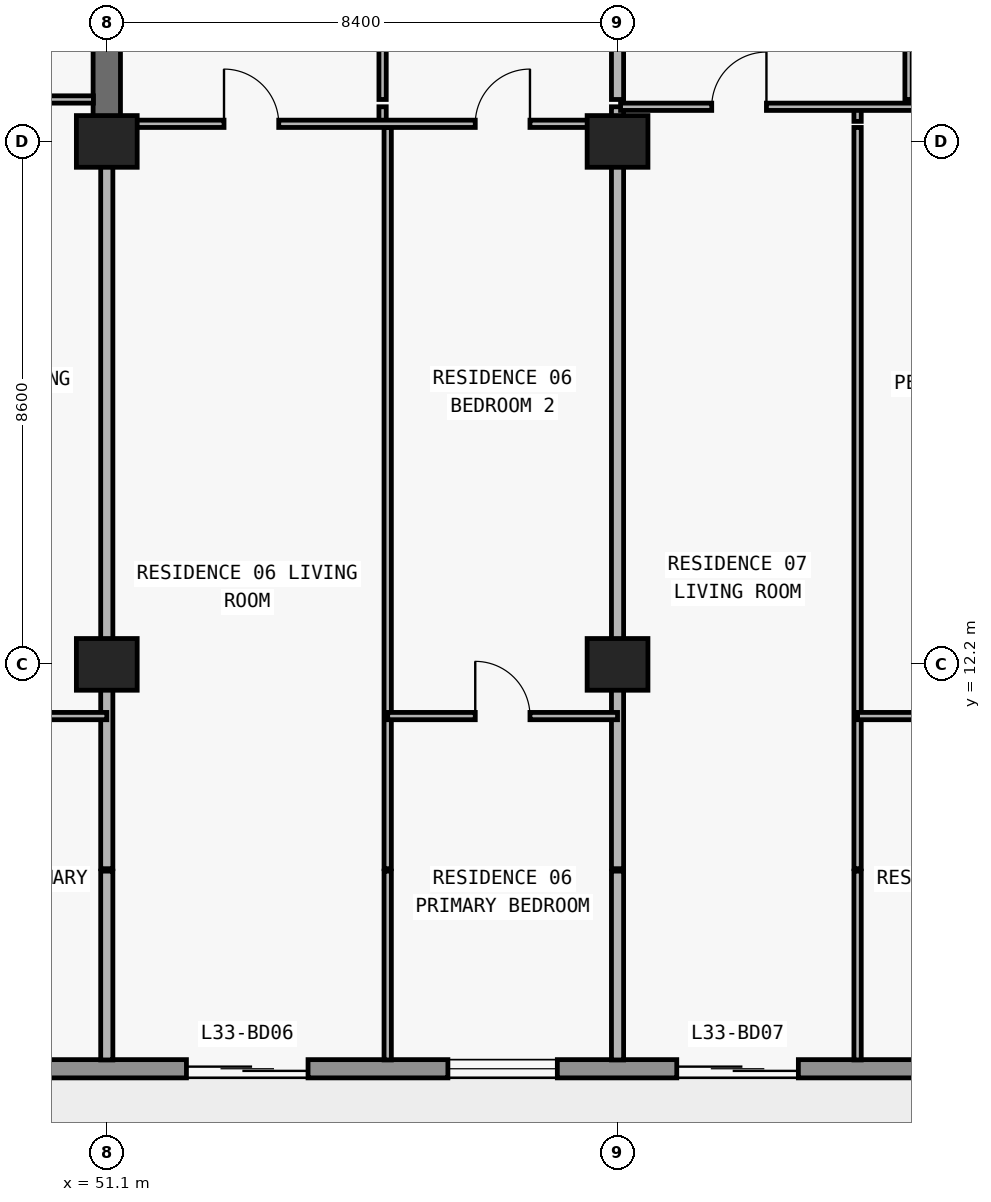
"""IFC4 building model, lengths in metres.
Left out: names, types, materials, properties, quantities, classifications, styles, units other than length and angle.
Written with IfcOpenShell. Run it as: python <this file> out.ifc"""

import sys

from ifc_helpers import new_model, si_unit, direction, frame, frame_2d, origin, origin_2d, place, context, subcontext, project, spatial, rectangle, extrude, element, fill, save


model = new_model("IFC4")
c1 = context("Model", 3, precision=1e-05, world=origin(), true_north=direction((0.0, 1.0)))
c2 = subcontext(c1, "Body", "Model", "MODEL_VIEW")
j1 = project(units=[si_unit("LENGTHUNIT", "METRE"), si_unit("PLANEANGLEUNIT", "RADIAN")], contexts=[c1])
p1 = place(None, origin())
s1 = spatial("IfcSite", under=j1, at=p1, CompositionType="ELEMENT")
p2 = place(p1, origin())
s2 = spatial("IfcBuilding", under=s1, at=p2, CompositionType="ELEMENT")
p3 = place(p2, frame((0.0, 0.0, 122.4)))
s3 = spatial("IfcBuildingStorey", under=s2, at=p3, CompositionType="ELEMENT", Elevation=122.4)
for number, where, z_axis, x_axis in (
    (1, (51.1, 12.2, 0.0), (0.0, 0.0, 1.0), (1.0, 0.0, 0.0)),
    (2, (59.5, 12.2, 0.0), (0.0, 0.0, 1.0), (1.0, 0.0, 0.0)),
    (3, (51.1, 20.8, 0.0), (0.0, 0.0, 1.0), (1.0, 0.0, 0.0)),
    (4, (59.5, 20.8, 0.0), (0.0, 0.0, 1.0), (1.0, 0.0, 0.0)),
):
    element("IfcColumn", number, at=place(p3, frame(where, z_axis=z_axis, x_axis=x_axis)), inside=s3, PredefinedType="COLUMN", context=c2, shape_type="SweptSolid", body=[
        extrude(rectangle(XDim=1.0, YDim=0.85, at=origin_2d()), origin(), (0.0, 0.0, 1.0), 3.05),
    ])
p4 = place(p3, frame((51.1, 20.8, 0.0), z_axis=(0.0, 0.0, 1.0), x_axis=(0.0, 1.0, 0.0)))
e5 = element("IfcWall", 5, at=p4, inside=s3, PredefinedType="SHEAR", context=c2, shape_type="SweptSolid", body=[
    extrude(rectangle(XDim=8.6, YDim=0.45, at=frame_2d((4.3, 0.0))), origin(), (0.0, 0.0, 1.0), 3.05),
])
p5 = place(p3, frame((70.1, 5.55, 0.0), z_axis=(0.0, 0.0, 1.0), x_axis=(-1.0, 0.0, 0.0)))
e6 = element("IfcWall", 6, at=p5, inside=s3, PredefinedType="STANDARD", context=c2, shape_type="SweptSolid", body=[
    extrude(rectangle(XDim=62.4, YDim=0.3, at=frame_2d((31.2, 0.0))), origin(), (0.0, 0.0, 1.0), 3.05),
])
p6 = place(p5, frame((57.226, 0.0, 0.0)))
e7 = element("IfcOpeningElement", 7, at=p6, cuts=e6, PredefinedType="OPENING", context=c2, shape_type="SweptSolid", body=[
    extrude(rectangle(XDim=2.0, YDim=2.3, at=frame_2d((1.0, 1.15))), frame((0.0, 0.16, 0.0), z_axis=(0.0, -1.0, 0.0), x_axis=(1.0, 0.0, 0.0)), (0.0, 0.0, 1.0), 0.32),
])
p7 = place(p5, frame((52.926, 0.0, 0.85)))
e8 = element("IfcOpeningElement", 8, at=p7, cuts=e6, PredefinedType="OPENING", context=c2, shape_type="SweptSolid", body=[
    extrude(rectangle(XDim=2.2, YDim=1.55, at=frame_2d((1.1, 0.775))), frame((0.0, 0.16, 0.0), z_axis=(0.0, -1.0, 0.0), x_axis=(1.0, 0.0, 0.0)), (0.0, 0.0, 1.0), 0.32),
])
p8 = place(p5, frame((48.49, 0.0, 0.0)))
e9 = element("IfcOpeningElement", 9, at=p8, cuts=e6, PredefinedType="OPENING", context=c2, shape_type="SweptSolid", body=[
    extrude(rectangle(XDim=2.0, YDim=2.3, at=frame_2d((1.0, 1.15))), frame((0.0, 0.16, 0.0), z_axis=(0.0, -1.0, 0.0), x_axis=(1.0, 0.0, 0.0)), (0.0, 0.0, 1.0), 0.32),
])
p9 = place(p5, frame((44.39, 0.0, 0.85)))
e10 = element("IfcOpeningElement", 10, at=p9, cuts=e6, PredefinedType="OPENING", context=c2, shape_type="SweptSolid", body=[
    extrude(rectangle(XDim=1.8, YDim=1.55, at=frame_2d((0.9, 0.775))), frame((0.0, 0.16, 0.0), z_axis=(0.0, -1.0, 0.0), x_axis=(1.0, 0.0, 0.0)), (0.0, 0.0, 1.0), 0.32),
])
p10 = place(p5, frame((40.426, 0.0, 0.0)))
e11 = element("IfcOpeningElement", 11, at=p10, cuts=e6, PredefinedType="OPENING", context=c2, shape_type="SweptSolid", body=[
    extrude(rectangle(XDim=2.0, YDim=2.3, at=frame_2d((1.0, 1.15))), frame((0.0, 0.16, 0.0), z_axis=(0.0, -1.0, 0.0), x_axis=(1.0, 0.0, 0.0)), (0.0, 0.0, 1.0), 0.32),
])
p11 = place(p5, frame((36.126, 0.0, 0.85)))
e12 = element("IfcOpeningElement", 12, at=p11, cuts=e6, PredefinedType="OPENING", context=c2, shape_type="SweptSolid", body=[
    extrude(rectangle(XDim=2.2, YDim=1.55, at=frame_2d((1.1, 0.775))), frame((0.0, 0.16, 0.0), z_axis=(0.0, -1.0, 0.0), x_axis=(1.0, 0.0, 0.0)), (0.0, 0.0, 1.0), 0.32),
])
p12 = place(p5, frame((31.91, 0.0, 0.0)))
e13 = element("IfcOpeningElement", 13, at=p12, cuts=e6, PredefinedType="OPENING", context=c2, shape_type="SweptSolid", body=[
    extrude(rectangle(XDim=2.0, YDim=2.3, at=frame_2d((1.0, 1.15))), frame((0.0, 0.16, 0.0), z_axis=(0.0, -1.0, 0.0), x_axis=(1.0, 0.0, 0.0)), (0.0, 0.0, 1.0), 0.32),
])
p13 = place(p5, frame((28.21, 0.0, 0.85)))
e14 = element("IfcOpeningElement", 14, at=p13, cuts=e6, PredefinedType="OPENING", context=c2, shape_type="SweptSolid", body=[
    extrude(rectangle(XDim=1.8, YDim=1.55, at=frame_2d((0.9, 0.775))), frame((0.0, 0.16, 0.0), z_axis=(0.0, -1.0, 0.0), x_axis=(1.0, 0.0, 0.0)), (0.0, 0.0, 1.0), 0.32),
])
p14 = place(p5, frame((24.426, 0.0, 0.0)))
e15 = element("IfcOpeningElement", 15, at=p14, cuts=e6, PredefinedType="OPENING", context=c2, shape_type="SweptSolid", body=[
    extrude(rectangle(XDim=2.0, YDim=2.3, at=frame_2d((1.0, 1.15))), frame((0.0, 0.16, 0.0), z_axis=(0.0, -1.0, 0.0), x_axis=(1.0, 0.0, 0.0)), (0.0, 0.0, 1.0), 0.32),
])
p15 = place(p5, frame((20.126, 0.0, 0.85)))
e16 = element("IfcOpeningElement", 16, at=p15, cuts=e6, PredefinedType="OPENING", context=c2, shape_type="SweptSolid", body=[
    extrude(rectangle(XDim=2.2, YDim=1.55, at=frame_2d((1.1, 0.775))), frame((0.0, 0.16, 0.0), z_axis=(0.0, -1.0, 0.0), x_axis=(1.0, 0.0, 0.0)), (0.0, 0.0, 1.0), 0.32),
])
p16 = place(p5, frame((15.69, 0.0, 0.0)))
e17 = element("IfcOpeningElement", 17, at=p16, cuts=e6, PredefinedType="OPENING", context=c2, shape_type="SweptSolid", body=[
    extrude(rectangle(XDim=2.0, YDim=2.3, at=frame_2d((1.0, 1.15))), frame((0.0, 0.16, 0.0), z_axis=(0.0, -1.0, 0.0), x_axis=(1.0, 0.0, 0.0)), (0.0, 0.0, 1.0), 0.32),
])
p17 = place(p5, frame((11.59, 0.0, 0.85)))
e18 = element("IfcOpeningElement", 18, at=p17, cuts=e6, PredefinedType="OPENING", context=c2, shape_type="SweptSolid", body=[
    extrude(rectangle(XDim=1.8, YDim=1.55, at=frame_2d((0.9, 0.775))), frame((0.0, 0.16, 0.0), z_axis=(0.0, -1.0, 0.0), x_axis=(1.0, 0.0, 0.0)), (0.0, 0.0, 1.0), 0.32),
])
p18 = place(p5, frame((7.626, 0.0, 0.0)))
e19 = element("IfcOpeningElement", 19, at=p18, cuts=e6, PredefinedType="OPENING", context=c2, shape_type="SweptSolid", body=[
    extrude(rectangle(XDim=2.0, YDim=2.3, at=frame_2d((1.0, 1.15))), frame((0.0, 0.16, 0.0), z_axis=(0.0, -1.0, 0.0), x_axis=(1.0, 0.0, 0.0)), (0.0, 0.0, 1.0), 0.32),
])
p19 = place(p5, frame((3.326, 0.0, 0.85)))
e20 = element("IfcOpeningElement", 20, at=p19, cuts=e6, PredefinedType="OPENING", context=c2, shape_type="SweptSolid", body=[
    extrude(rectangle(XDim=2.2, YDim=1.55, at=frame_2d((1.1, 0.775))), frame((0.0, 0.16, 0.0), z_axis=(0.0, -1.0, 0.0), x_axis=(1.0, 0.0, 0.0)), (0.0, 0.0, 1.0), 0.32),
])
p20 = place(p3, frame((51.1, 5.695, 0.0), z_axis=(0.0, 0.0, 1.0), x_axis=(0.0, 1.0, 0.0)))
e21 = element("IfcWall", 21, at=p20, inside=s3, PredefinedType="PARTITIONING", context=c2, shape_type="SweptSolid", body=[
    extrude(rectangle(XDim=3.105, YDim=0.2, at=frame_2d((1.552, 0.0))), origin(), (0.0, 0.0, 1.0), 3.05),
])
p21 = place(p3, frame((51.1, 8.84, 0.0), z_axis=(0.0, 0.0, 1.0), x_axis=(0.0, 1.0, 0.0)))
e22 = element("IfcWall", 22, at=p21, inside=s3, PredefinedType="PARTITIONING", context=c2, shape_type="SweptSolid", body=[
    extrude(rectangle(XDim=11.955, YDim=0.2, at=frame_2d((5.978, 0.0))), origin(), (0.0, 0.0, 1.0), 2.174),
])
p22 = place(p3, frame((55.636, 21.13, 0.0), z_axis=(0.0, 0.0, 1.0), x_axis=(0.0, 1.0, 0.0)))
e23 = element("IfcWall", 23, at=p22, inside=s3, PredefinedType="PARTITIONING", context=c2, shape_type="SweptSolid", body=[
    extrude(rectangle(XDim=0.24, YDim=0.12, at=frame_2d((0.12, 0.0))), origin(), (0.0, 0.0, 1.0), 3.05),
])
p23 = place(p3, frame((55.636, 21.49, 0.0), z_axis=(0.0, 0.0, 1.0), x_axis=(0.0, 1.0, 0.0)))
e24 = element("IfcWall", 24, at=p23, inside=s3, PredefinedType="PARTITIONING", context=c2, shape_type="SweptSolid", body=[
    extrude(rectangle(XDim=4.69, YDim=0.12, at=frame_2d((2.345, 0.0))), origin(), (0.0, 0.0, 1.0), 3.05),
])
p24 = place(p23, frame((1.895, 0.0, 0.0)))
e25 = element("IfcOpeningElement", 25, at=p24, cuts=e24, PredefinedType="OPENING", context=c2, shape_type="SweptSolid", body=[
    extrude(rectangle(XDim=0.9, YDim=2.15, at=frame_2d((0.45, 1.075))), frame((0.0, 0.07, 0.0), z_axis=(0.0, -1.0, 0.0), x_axis=(1.0, 0.0, 0.0)), (0.0, 0.0, 1.0), 0.14),
])
p25 = place(p3, frame((55.72, 5.695, 0.0), z_axis=(0.0, 0.0, 1.0), x_axis=(0.0, 1.0, 0.0)))
e26 = element("IfcWall", 26, at=p25, inside=s3, PredefinedType="PARTITIONING", context=c2, shape_type="SweptSolid", body=[
    extrude(rectangle(XDim=3.105, YDim=0.12, at=frame_2d((1.552, 0.0))), origin(), (0.0, 0.0, 1.0), 3.05),
])
p26 = place(p3, frame((55.72, 8.84, 0.0), z_axis=(0.0, 0.0, 1.0), x_axis=(0.0, 1.0, 0.0)))
e27 = element("IfcWall", 27, at=p26, inside=s3, PredefinedType="PARTITIONING", context=c2, shape_type="SweptSolid", body=[
    extrude(rectangle(XDim=12.19, YDim=0.12, at=frame_2d((6.095, 0.0))), origin(), (0.0, 0.0, 1.0), 3.05),
])
p27 = place(p3, frame((59.5, 5.695, 0.0), z_axis=(0.0, 0.0, 1.0), x_axis=(0.0, 1.0, 0.0)))
e28 = element("IfcWall", 28, at=p27, inside=s3, PredefinedType="PARTITIONING", context=c2, shape_type="SweptSolid", body=[
    extrude(rectangle(XDim=3.105, YDim=0.2, at=frame_2d((1.552, 0.0))), origin(), (0.0, 0.0, 1.0), 3.05),
])
p28 = place(p3, frame((59.5, 8.84, 0.0), z_axis=(0.0, 0.0, 1.0), x_axis=(0.0, 1.0, 0.0)))
e29 = element("IfcWall", 29, at=p28, inside=s3, PredefinedType="PARTITIONING", context=c2, shape_type="SweptSolid", body=[
    extrude(rectangle(XDim=12.19, YDim=0.2, at=frame_2d((6.095, 0.0))), origin(), (0.0, 0.0, 1.0), 2.174),
])
p29 = place(p3, frame((59.5, 21.13, 0.0), z_axis=(0.0, 0.0, 1.0), x_axis=(0.0, 1.0, 0.0)))
e30 = element("IfcWall", 30, at=p29, inside=s3, PredefinedType="PARTITIONING", context=c2, shape_type="SweptSolid", body=[
    extrude(rectangle(XDim=0.24, YDim=0.2, at=frame_2d((0.12, 0.0))), origin(), (0.0, 0.0, 1.0), 2.174),
])
p30 = place(p3, frame((59.5, 21.49, 0.0), z_axis=(0.0, 0.0, 1.0), x_axis=(0.0, 1.0, 0.0)))
e31 = element("IfcWall", 31, at=p30, inside=s3, PredefinedType="PARTITIONING", context=c2, shape_type="SweptSolid", body=[
    extrude(rectangle(XDim=4.69, YDim=0.2, at=frame_2d((2.345, 0.0))), origin(), (0.0, 0.0, 1.0), 2.174),
])
p31 = place(p3, frame((63.448, 5.695, 0.0), z_axis=(0.0, 0.0, 1.0), x_axis=(0.0, 1.0, 0.0)))
e32 = element("IfcWall", 32, at=p31, inside=s3, PredefinedType="PARTITIONING", context=c2, shape_type="SweptSolid", body=[
    extrude(rectangle(XDim=3.105, YDim=0.12, at=frame_2d((1.552, 0.0))), origin(), (0.0, 0.0, 1.0), 3.05),
])
p32 = place(p3, frame((63.448, 8.84, 0.0), z_axis=(0.0, 0.0, 1.0), x_axis=(0.0, 1.0, 0.0)))
e33 = element("IfcWall", 33, at=p32, inside=s3, PredefinedType="PARTITIONING", context=c2, shape_type="SweptSolid", body=[
    extrude(rectangle(XDim=12.19, YDim=0.12, at=frame_2d((6.095, 0.0))), origin(), (0.0, 0.0, 1.0), 3.05),
])
p33 = place(p3, frame((63.448, 21.13, 0.0), z_axis=(0.0, 0.0, 1.0), x_axis=(0.0, 1.0, 0.0)))
e34 = element("IfcWall", 34, at=p33, inside=s3, PredefinedType="PARTITIONING", context=c2, shape_type="SweptSolid", body=[
    extrude(rectangle(XDim=0.24, YDim=0.12, at=frame_2d((0.12, 0.0))), origin(), (0.0, 0.0, 1.0), 3.05),
])
p34 = place(p3, frame((64.286, 21.49, 0.0), z_axis=(0.0, 0.0, 1.0), x_axis=(0.0, 1.0, 0.0)))
e35 = element("IfcWall", 35, at=p34, inside=s3, PredefinedType="PARTITIONING", context=c2, shape_type="SweptSolid", body=[
    extrude(rectangle(XDim=4.69, YDim=0.12, at=frame_2d((2.345, 0.0))), origin(), (0.0, 0.0, 1.0), 3.05),
])
p35 = place(p34, frame((1.895, 0.0, 0.0)))
e36 = element("IfcOpeningElement", 36, at=p35, cuts=e35, PredefinedType="OPENING", context=c2, shape_type="SweptSolid", body=[
    extrude(rectangle(XDim=0.9, YDim=2.15, at=frame_2d((0.45, 1.075))), frame((0.0, 0.07, 0.0), z_axis=(0.0, -1.0, 0.0), x_axis=(1.0, 0.0, 0.0)), (0.0, 0.0, 1.0), 0.14),
])
p36 = place(p3, frame((46.648, 11.35, 0.0), z_axis=(0.0, 0.0, 1.0), x_axis=(1.0, 0.0, 0.0)))
e37 = element("IfcWall", 37, at=p36, inside=s3, PredefinedType="PARTITIONING", context=c2, shape_type="SweptSolid", body=[
    extrude(rectangle(XDim=4.452, YDim=0.12, at=frame_2d((2.226, 0.0))), origin(), (0.0, 0.0, 1.0), 3.05),
])
p37 = place(p36, frame((1.776, 0.0, 0.0)))
e38 = element("IfcOpeningElement", 38, at=p37, cuts=e37, PredefinedType="OPENING", context=c2, shape_type="SweptSolid", body=[
    extrude(rectangle(XDim=0.9, YDim=2.15, at=frame_2d((0.45, 1.075))), frame((0.0, 0.07, 0.0), z_axis=(0.0, -1.0, 0.0), x_axis=(1.0, 0.0, 0.0)), (0.0, 0.0, 1.0), 0.14),
])
p38 = place(p3, frame((55.72, 11.35, 0.0), z_axis=(0.0, 0.0, 1.0), x_axis=(1.0, 0.0, 0.0)))
e39 = element("IfcWall", 39, at=p38, inside=s3, PredefinedType="PARTITIONING", context=c2, shape_type="SweptSolid", body=[
    extrude(rectangle(XDim=3.78, YDim=0.12, at=frame_2d((1.89, 0.0))), origin(), (0.0, 0.0, 1.0), 3.05),
])
p39 = place(p38, frame((1.44, 0.0, 0.0)))
e40 = element("IfcOpeningElement", 40, at=p39, cuts=e39, PredefinedType="OPENING", context=c2, shape_type="SweptSolid", body=[
    extrude(rectangle(XDim=0.9, YDim=2.15, at=frame_2d((0.45, 1.075))), frame((0.0, 0.07, 0.0), z_axis=(0.0, -1.0, 0.0), x_axis=(1.0, 0.0, 0.0)), (0.0, 0.0, 1.0), 0.14),
])
p40 = place(p3, frame((63.448, 11.35, 0.0), z_axis=(0.0, 0.0, 1.0), x_axis=(1.0, 0.0, 0.0)))
e41 = element("IfcWall", 41, at=p40, inside=s3, PredefinedType="PARTITIONING", context=c2, shape_type="SweptSolid", body=[
    extrude(rectangle(XDim=4.452, YDim=0.12, at=frame_2d((2.226, 0.0))), origin(), (0.0, 0.0, 1.0), 3.05),
])
p41 = place(p40, frame((1.776, 0.0, 0.0)))
e42 = element("IfcOpeningElement", 42, at=p41, cuts=e41, PredefinedType="OPENING", context=c2, shape_type="SweptSolid", body=[
    extrude(rectangle(XDim=0.9, YDim=2.15, at=frame_2d((0.45, 1.075))), frame((0.0, 0.07, 0.0), z_axis=(0.0, -1.0, 0.0), x_axis=(1.0, 0.0, 0.0)), (0.0, 0.0, 1.0), 0.14),
])
p42 = place(p3, frame((51.32, 21.09, 0.0), z_axis=(0.0, 0.0, 1.0), x_axis=(1.0, 0.0, 0.0)))
e43 = element("IfcWall", 43, at=p42, inside=s3, PredefinedType="PARTITIONING", context=c2, shape_type="SweptSolid", body=[
    extrude(rectangle(XDim=8.18, YDim=0.12, at=frame_2d((4.09, 0.0))), origin(), (0.0, 0.0, 1.0), 2.174),
])
p43 = place(p42, frame((1.708, 0.0, 0.0)))
e44 = element("IfcOpeningElement", 44, at=p43, cuts=e43, PredefinedType="OPENING", context=c2, shape_type="SweptSolid", body=[
    extrude(rectangle(XDim=0.9, YDim=2.124, at=frame_2d((0.45, 1.062))), frame((0.0, 0.07, 0.0), z_axis=(0.0, -1.0, 0.0), x_axis=(1.0, 0.0, 0.0)), (0.0, 0.0, 1.0), 0.14),
])
p44 = place(p42, frame((5.84, 0.0, 0.0)))
e45 = element("IfcOpeningElement", 45, at=p44, cuts=e43, PredefinedType="OPENING", context=c2, shape_type="SweptSolid", body=[
    extrude(rectangle(XDim=0.9, YDim=2.124, at=frame_2d((0.45, 1.062))), frame((0.0, 0.07, 0.0), z_axis=(0.0, -1.0, 0.0), x_axis=(1.0, 0.0, 0.0)), (0.0, 0.0, 1.0), 0.14),
])
p45 = place(p3, frame((59.55, 21.37, 0.0), z_axis=(0.0, 0.0, 1.0), x_axis=(1.0, 0.0, 0.0)))
e46 = element("IfcWall", 46, at=p45, inside=s3, PredefinedType="PARTITIONING", context=c2, shape_type="SweptSolid", body=[
    extrude(rectangle(XDim=8.35, YDim=0.12, at=frame_2d((4.175, 0.0))), origin(), (0.0, 0.0, 1.0), 3.05),
])
p46 = place(p45, frame((1.499, 0.0, 0.0)))
e47 = element("IfcOpeningElement", 47, at=p46, cuts=e46, PredefinedType="OPENING", context=c2, shape_type="SweptSolid", body=[
    extrude(rectangle(XDim=0.9, YDim=2.15, at=frame_2d((0.45, 1.075))), frame((0.0, 0.07, 0.0), z_axis=(0.0, -1.0, 0.0), x_axis=(1.0, 0.0, 0.0)), (0.0, 0.0, 1.0), 0.14),
])
p47 = place(p45, frame((6.093, 0.0, 0.0)))
e48 = element("IfcOpeningElement", 48, at=p47, cuts=e46, PredefinedType="OPENING", context=c2, shape_type="SweptSolid", body=[
    extrude(rectangle(XDim=0.9, YDim=2.15, at=frame_2d((0.45, 1.075))), frame((0.0, 0.07, 0.0), z_axis=(0.0, -1.0, 0.0), x_axis=(1.0, 0.0, 0.0)), (0.0, 0.0, 1.0), 0.14),
])
p48 = place(p3, frame((42.7, 21.49, 0.0), z_axis=(0.0, 0.0, 1.0), x_axis=(1.0, 0.0, 0.0)))
e49 = element("IfcWall", 49, at=p48, inside=s3, PredefinedType="PARTITIONING", context=c2, shape_type="SweptSolid", body=[
    extrude(rectangle(XDim=8.18, YDim=0.12, at=frame_2d((4.09, 0.0))), origin(), (0.0, 0.0, 1.0), 3.05),
])
p49 = place(p48, frame((1.524, 0.0, 0.0)))
e50 = element("IfcOpeningElement", 50, at=p49, cuts=e49, PredefinedType="OPENING", context=c2, shape_type="SweptSolid", body=[
    extrude(rectangle(XDim=0.9, YDim=2.15, at=frame_2d((0.45, 1.075))), frame((0.0, 0.07, 0.0), z_axis=(0.0, -1.0, 0.0), x_axis=(1.0, 0.0, 0.0)), (0.0, 0.0, 1.0), 0.14),
])
p50 = place(p48, frame((5.783, 0.0, 0.0)))
e51 = element("IfcOpeningElement", 51, at=p50, cuts=e49, PredefinedType="OPENING", context=c2, shape_type="SweptSolid", body=[
    extrude(rectangle(XDim=0.9, YDim=2.15, at=frame_2d((0.45, 1.075))), frame((0.0, 0.07, 0.0), z_axis=(0.0, -1.0, 0.0), x_axis=(1.0, 0.0, 0.0)), (0.0, 0.0, 1.0), 0.14),
])
p51 = place(p16, origin())
e52 = element("IfcDoor", 52, at=p51, inside=s3, OperationType="DOUBLE_DOOR_SLIDING", PredefinedType="DOOR", context=c2, shape_type="SweptSolid", body=[
    extrude(rectangle(XDim=2.0, YDim=2.3, at=frame_2d((1.0, 1.15))), frame((0.0, 0.025, 0.0), z_axis=(0.0, -1.0, 0.0), x_axis=(1.0, 0.0, 0.0)), (0.0, 0.0, 1.0), 0.05),
])
fill(e17, e52)
p52 = place(p17, origin())
e53 = element("IfcWindow", 53, at=p52, inside=s3, PartitioningType="SINGLE_PANEL", PredefinedType="WINDOW", context=c2, shape_type="SweptSolid", body=[
    extrude(rectangle(XDim=1.8, YDim=1.55, at=frame_2d((0.9, 0.775))), frame((0.0, 0.03, 0.0), z_axis=(0.0, -1.0, 0.0), x_axis=(1.0, 0.0, 0.0)), (0.0, 0.0, 1.0), 0.06),
])
fill(e18, e53)
p53 = place(p18, origin())
e54 = element("IfcDoor", 54, at=p53, inside=s3, OperationType="DOUBLE_DOOR_SLIDING", PredefinedType="DOOR", context=c2, shape_type="SweptSolid", body=[
    extrude(rectangle(XDim=2.0, YDim=2.3, at=frame_2d((1.0, 1.15))), frame((0.0, 0.025, 0.0), z_axis=(0.0, -1.0, 0.0), x_axis=(1.0, 0.0, 0.0)), (0.0, 0.0, 1.0), 0.05),
])
fill(e19, e54)
p54 = place(p43, origin())
e55 = element("IfcDoor", 55, at=p54, inside=s3, OperationType="SINGLE_SWING_LEFT", PredefinedType="DOOR", context=c2, shape_type="SweptSolid", body=[
    extrude(rectangle(XDim=0.9, YDim=2.124, at=frame_2d((0.45, 1.062))), frame((0.0, 0.025, 0.0), z_axis=(0.0, -1.0, 0.0), x_axis=(1.0, 0.0, 0.0)), (0.0, 0.0, 1.0), 0.05),
])
fill(e44, e55)
p55 = place(p44, origin())
e56 = element("IfcDoor", 56, at=p55, inside=s3, OperationType="SINGLE_SWING_RIGHT", PredefinedType="DOOR", context=c2, shape_type="SweptSolid", body=[
    extrude(rectangle(XDim=0.9, YDim=2.124, at=frame_2d((0.45, 1.062))), frame((0.0, 0.025, 0.0), z_axis=(0.0, -1.0, 0.0), x_axis=(1.0, 0.0, 0.0)), (0.0, 0.0, 1.0), 0.05),
])
fill(e45, e56)
p56 = place(p39, origin())
e57 = element("IfcDoor", 57, at=p56, inside=s3, OperationType="SINGLE_SWING_LEFT", PredefinedType="DOOR", context=c2, shape_type="SweptSolid", body=[
    extrude(rectangle(XDim=0.9, YDim=2.15, at=frame_2d((0.45, 1.075))), frame((0.0, 0.025, 0.0), z_axis=(0.0, -1.0, 0.0), x_axis=(1.0, 0.0, 0.0)), (0.0, 0.0, 1.0), 0.05),
])
fill(e40, e57)
p57 = place(p46, origin())
e58 = element("IfcDoor", 58, at=p57, inside=s3, OperationType="SINGLE_SWING_RIGHT", PredefinedType="DOOR", context=c2, shape_type="SweptSolid", body=[
    extrude(rectangle(XDim=0.9, YDim=2.15, at=frame_2d((0.45, 1.075))), frame((0.0, 0.025, 0.0), z_axis=(0.0, -1.0, 0.0), x_axis=(1.0, 0.0, 0.0)), (0.0, 0.0, 1.0), 0.05),
])
fill(e47, e58)
save(model, sys.argv[1])
